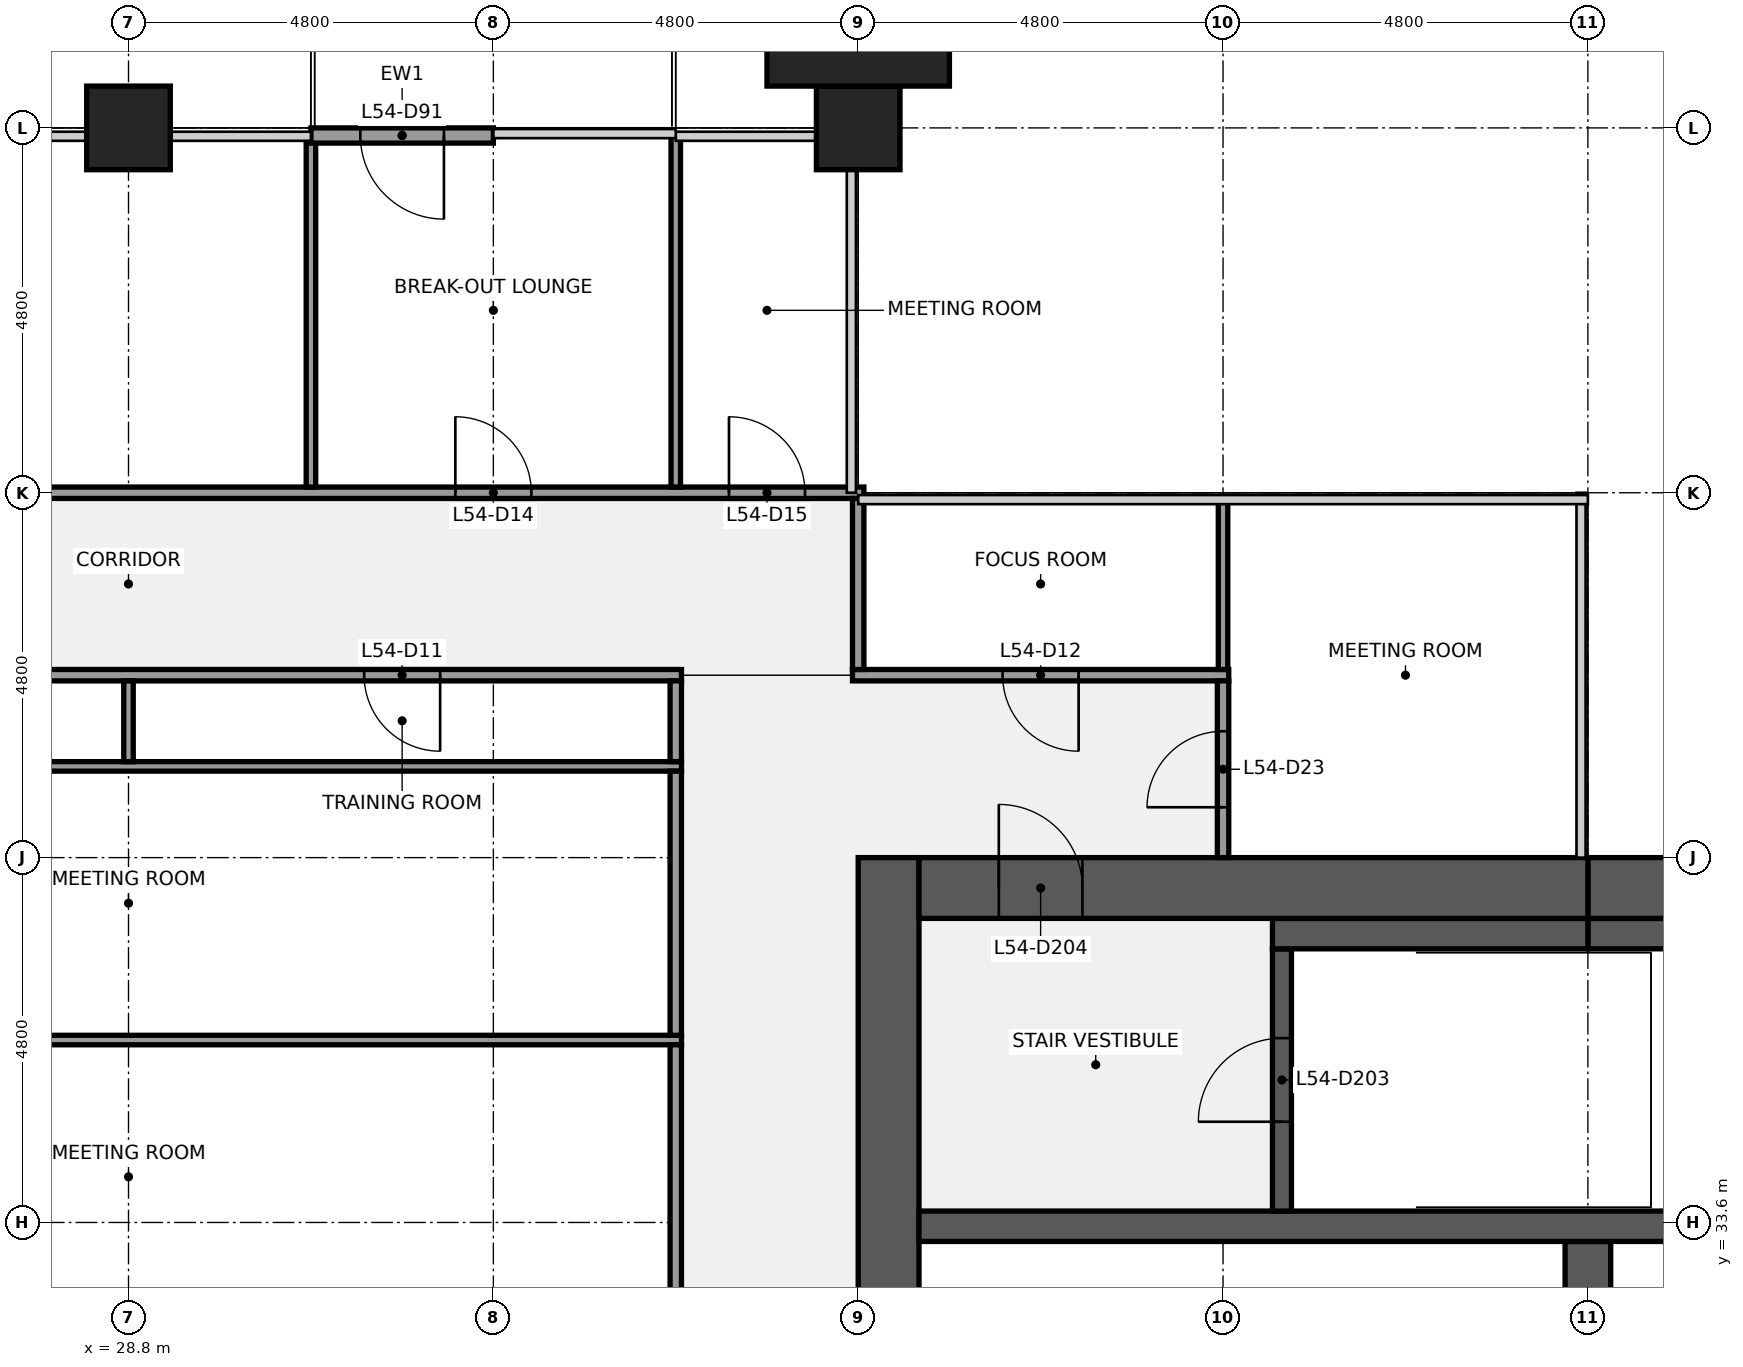
"""IFC4 building model, lengths in metres.
Left out: names, types, materials, properties, quantities, classifications, styles, units other than length and angle.
Written with IfcOpenShell. Run it as: python <this file> out.ifc"""

import sys

from ifc_helpers import new_model, si_unit, direction, frame, frame_2d, origin, origin_2d, place, context, subcontext, project, spatial, rectangle, extrude, element, fill, save


model = new_model("IFC4")
c1 = context("Model", 3, precision=1e-05, world=origin(), true_north=direction((0.0, 1.0)))
c2 = subcontext(c1, "Body", "Model", "MODEL_VIEW")
j1 = project(units=[si_unit("LENGTHUNIT", "METRE"), si_unit("PLANEANGLEUNIT", "RADIAN")], contexts=[c1])
p1 = place(None, origin())
s1 = spatial("IfcSite", under=j1, at=p1, CompositionType="ELEMENT")
p2 = place(p1, origin())
s2 = spatial("IfcBuilding", under=s1, at=p2, CompositionType="ELEMENT")
p3 = place(p2, frame((0.0, 0.0, 245.2)))
s3 = spatial("IfcBuildingStorey", under=s2, at=p3, CompositionType="ELEMENT", Elevation=245.2)
for number, where, z_axis, x_axis in (
    (1, (28.8, 48.0, 0.0), (0.0, 0.0, 1.0), (1.0, 0.0, 0.0)),
    (2, (38.4, 48.0, 0.0), (0.0, 0.0, 1.0), (1.0, 0.0, 0.0)),
):
    element("IfcColumn", number, at=place(p3, frame(where, z_axis=z_axis, x_axis=x_axis)), inside=s3, PredefinedType="COLUMN", context=c2, shape_type="SweptSolid", body=[
        extrude(rectangle(XDim=1.1, YDim=1.1, at=origin_2d()), origin(), (0.0, 0.0, 1.0), 4.0),
    ])
p4 = place(p3, frame((38.8, 9.6, 0.0), z_axis=(0.0, 0.0, 1.0), x_axis=(0.0, 1.0, 0.0)))
e3 = element("IfcWall", 3, at=p4, inside=s3, PredefinedType="SHEAR", context=c2, shape_type="SweptSolid", body=[
    extrude(rectangle(XDim=28.8, YDim=0.8, at=frame_2d((14.4, 0.0))), origin(), (0.0, 0.0, 1.0), 3.84),
])
p5 = place(p4, frame((8.7, 0.0, 0.0)))
e4 = element("IfcOpeningElement", 4, at=p5, cuts=e3, PredefinedType="OPENING", context=c2, shape_type="SweptSolid", body=[
    extrude(rectangle(XDim=1.8, YDim=2.1, at=frame_2d((0.9, 1.05))), frame((0.0, 0.41, 0.0), z_axis=(0.0, -1.0, 0.0), x_axis=(1.0, 0.0, 0.0)), (0.0, 0.0, 1.0), 0.82),
])
p6 = place(p4, frame((18.3, 0.0, 0.0)))
e5 = element("IfcOpeningElement", 5, at=p6, cuts=e3, PredefinedType="OPENING", context=c2, shape_type="SweptSolid", body=[
    extrude(rectangle(XDim=1.8, YDim=2.1, at=frame_2d((0.9, 1.05))), frame((0.0, 0.41, 0.0), z_axis=(0.0, -1.0, 0.0), x_axis=(1.0, 0.0, 0.0)), (0.0, 0.0, 1.0), 0.82),
])
p7 = place(p3, frame((48.0, 30.75, 0.0), z_axis=(0.0, 0.0, 1.0), x_axis=(0.0, 1.0, 0.0)))
e6 = element("IfcWall", 6, at=p7, inside=s3, PredefinedType="SHEAR", context=c2, shape_type="SweptSolid", body=[
    extrude(rectangle(XDim=2.6, YDim=0.6, at=frame_2d((1.3, 0.0))), origin(), (0.0, 0.0, 1.0), 3.84),
])
p8 = place(p3, frame((39.2, 33.55, 0.0), z_axis=(0.0, 0.0, 1.0), x_axis=(1.0, 0.0, 0.0)))
e7 = element("IfcWall", 7, at=p8, inside=s3, PredefinedType="SHEAR", context=c2, shape_type="SweptSolid", body=[
    extrude(rectangle(XDim=17.6, YDim=0.4, at=frame_2d((8.8, 0.0))), origin(), (0.0, 0.0, 1.0), 3.84),
])
p9 = place(p3, frame((43.975, 33.75, 0.0), z_axis=(0.0, 0.0, 1.0), x_axis=(0.0, 1.0, 0.0)))
e8 = element("IfcWall", 8, at=p9, inside=s3, PredefinedType="SHEAR", context=c2, shape_type="SweptSolid", body=[
    extrude(rectangle(XDim=3.45, YDim=0.25, at=frame_2d((1.725, 0.0))), origin(), (0.0, 0.0, 1.0), 3.84),
])
p10 = place(p9, frame((1.175, 0.0, 0.0)))
e9 = element("IfcOpeningElement", 9, at=p10, cuts=e8, PredefinedType="OPENING", context=c2, shape_type="SweptSolid", body=[
    extrude(rectangle(XDim=1.1, YDim=2.1, at=frame_2d((0.55, 1.05))), frame((0.0, 0.135, 0.0), z_axis=(0.0, -1.0, 0.0), x_axis=(1.0, 0.0, 0.0)), (0.0, 0.0, 1.0), 0.27),
])
p11 = place(p3, frame((48.0, 37.4, 0.0), z_axis=(0.0, 0.0, 1.0), x_axis=(1.0, 0.0, 0.0)))
e10 = element("IfcWall", 10, at=p11, inside=s3, PredefinedType="SHEAR", context=c2, shape_type="SweptSolid", body=[
    extrude(rectangle(XDim=3.35, YDim=0.4, at=frame_2d((1.675, 0.0))), origin(), (0.0, 0.0, 1.0), 3.84),
])
p12 = place(p3, frame((43.85, 37.4, 0.0), z_axis=(0.0, 0.0, 1.0), x_axis=(1.0, 0.0, 0.0)))
e11 = element("IfcWall", 11, at=p12, inside=s3, PredefinedType="SHEAR", context=c2, shape_type="SweptSolid", body=[
    extrude(rectangle(XDim=4.15, YDim=0.4, at=frame_2d((2.075, 0.0))), origin(), (0.0, 0.0, 1.0), 3.84),
])
p13 = place(p3, frame((48.0, 38.0, 0.0), z_axis=(0.0, 0.0, 1.0), x_axis=(1.0, 0.0, 0.0)))
e12 = element("IfcWall", 12, at=p13, inside=s3, PredefinedType="SHEAR", context=c2, shape_type="SweptSolid", body=[
    extrude(rectangle(XDim=8.8, YDim=0.8, at=frame_2d((4.4, 0.0))), origin(), (0.0, 0.0, 1.0), 3.84),
])
p14 = place(p13, frame((1.5, 0.0, 0.9)))
e13 = element("IfcOpeningElement", 13, at=p14, cuts=e12, PredefinedType="OPENING", context=c2, shape_type="SweptSolid", body=[
    extrude(rectangle(XDim=1.8, YDim=1.5, at=frame_2d((0.9, 0.75))), frame((0.0, 0.41, 0.0), z_axis=(0.0, -1.0, 0.0), x_axis=(1.0, 0.0, 0.0)), (0.0, 0.0, 1.0), 0.82),
])
p15 = place(p3, frame((39.2, 38.0, 0.0), z_axis=(0.0, 0.0, 1.0), x_axis=(1.0, 0.0, 0.0)))
e14 = element("IfcWall", 14, at=p15, inside=s3, PredefinedType="SHEAR", context=c2, shape_type="SweptSolid", body=[
    extrude(rectangle(XDim=8.8, YDim=0.8, at=frame_2d((4.4, 0.0))), origin(), (0.0, 0.0, 1.0), 3.84),
])
p16 = place(p15, frame((1.05, 0.0, 0.0)))
e15 = element("IfcOpeningElement", 15, at=p16, cuts=e14, PredefinedType="OPENING", context=c2, shape_type="SweptSolid", body=[
    extrude(rectangle(XDim=1.1, YDim=2.1, at=frame_2d((0.55, 1.05))), frame((0.0, 0.41, 0.0), z_axis=(0.0, -1.0, 0.0), x_axis=(1.0, 0.0, 0.0)), (0.0, 0.0, 1.0), 0.82),
])
for number, where, z_axis, x_axis in (
    (16, (21.525, 36.0, 0.0), (0.0, 0.0, 1.0), (1.0, 0.0, 0.0)),
    (17, (21.525, 39.6, 0.0), (0.0, 0.0, 1.0), (1.0, 0.0, 0.0)),
):
    element("IfcWall", number, at=place(p3, frame(where, z_axis=z_axis, x_axis=x_axis)), inside=s3, PredefinedType="PARTITIONING", context=c2, shape_type="SweptSolid", body=[
        extrude(rectangle(XDim=14.55, YDim=0.125, at=frame_2d((7.275, 0.0))), origin(), (0.0, 0.0, 1.0), 2.87),
    ])
p17 = place(p3, frame((21.525, 40.8, 0.0), z_axis=(0.0, 0.0, 1.0), x_axis=(1.0, 0.0, 0.0)))
e18 = element("IfcWall", 18, at=p17, inside=s3, PredefinedType="PARTITIONING", context=c2, shape_type="SweptSolid", body=[
    extrude(rectangle(XDim=14.55, YDim=0.15, at=frame_2d((7.275, 0.0))), origin(), (0.0, 0.0, 1.0), 2.87),
])
p18 = place(p17, frame((3.175, 0.0, 0.0)))
e19 = element("IfcOpeningElement", 19, at=p18, cuts=e18, PredefinedType="OPENING", context=c2, shape_type="SweptSolid", body=[
    extrude(rectangle(XDim=1.0, YDim=2.1, at=frame_2d((0.5, 1.05))), frame((0.0, 0.085, 0.0), z_axis=(0.0, -1.0, 0.0), x_axis=(1.0, 0.0, 0.0)), (0.0, 0.0, 1.0), 0.17),
])
p19 = place(p17, frame((10.375, 0.0, 0.0)))
e20 = element("IfcOpeningElement", 20, at=p19, cuts=e18, PredefinedType="OPENING", context=c2, shape_type="SweptSolid", body=[
    extrude(rectangle(XDim=1.0, YDim=2.1, at=frame_2d((0.5, 1.05))), frame((0.0, 0.085, 0.0), z_axis=(0.0, -1.0, 0.0), x_axis=(1.0, 0.0, 0.0)), (0.0, 0.0, 1.0), 0.17),
])
p20 = place(p3, frame((38.325, 40.8, 0.0), z_axis=(0.0, 0.0, 1.0), x_axis=(1.0, 0.0, 0.0)))
e21 = element("IfcWall", 21, at=p20, inside=s3, PredefinedType="PARTITIONING", context=c2, shape_type="SweptSolid", body=[
    extrude(rectangle(XDim=4.95, YDim=0.15, at=frame_2d((2.475, 0.0))), origin(), (0.0, 0.0, 1.0), 2.87),
])
p21 = place(p20, frame((1.975, 0.0, 0.0)))
e22 = element("IfcOpeningElement", 22, at=p21, cuts=e21, PredefinedType="OPENING", context=c2, shape_type="SweptSolid", body=[
    extrude(rectangle(XDim=1.0, YDim=2.1, at=frame_2d((0.5, 1.05))), frame((0.0, 0.085, 0.0), z_axis=(0.0, -1.0, 0.0), x_axis=(1.0, 0.0, 0.0)), (0.0, 0.0, 1.0), 0.17),
])
p22 = place(p3, frame((19.125, 43.2, 0.0), z_axis=(0.0, 0.0, 1.0), x_axis=(1.0, 0.0, 0.0)))
e23 = element("IfcWall", 23, at=p22, inside=s3, PredefinedType="PARTITIONING", context=c2, shape_type="SweptSolid", body=[
    extrude(rectangle(XDim=19.35, YDim=0.15, at=frame_2d((9.675, 0.0))), origin(), (0.0, 0.0, 1.0), 2.87),
])
p23 = place(p22, frame((5.575, 0.0, 0.0)))
e24 = element("IfcOpeningElement", 24, at=p23, cuts=e23, PredefinedType="OPENING", context=c2, shape_type="SweptSolid", body=[
    extrude(rectangle(XDim=1.0, YDim=2.1, at=frame_2d((0.5, 1.05))), frame((0.0, 0.085, 0.0), z_axis=(0.0, -1.0, 0.0), x_axis=(1.0, 0.0, 0.0)), (0.0, 0.0, 1.0), 0.17),
])
p24 = place(p22, frame((13.975, 0.0, 0.0)))
e25 = element("IfcOpeningElement", 25, at=p24, cuts=e23, PredefinedType="OPENING", context=c2, shape_type="SweptSolid", body=[
    extrude(rectangle(XDim=1.0, YDim=2.1, at=frame_2d((0.5, 1.05))), frame((0.0, 0.085, 0.0), z_axis=(0.0, -1.0, 0.0), x_axis=(1.0, 0.0, 0.0)), (0.0, 0.0, 1.0), 0.17),
])
p25 = place(p22, frame((17.575, 0.0, 0.0)))
e26 = element("IfcOpeningElement", 26, at=p25, cuts=e23, PredefinedType="OPENING", context=c2, shape_type="SweptSolid", body=[
    extrude(rectangle(XDim=1.0, YDim=2.1, at=frame_2d((0.5, 1.05))), frame((0.0, 0.085, 0.0), z_axis=(0.0, -1.0, 0.0), x_axis=(1.0, 0.0, 0.0)), (0.0, 0.0, 1.0), 0.17),
])
p26 = place(p3, frame((28.8, 39.663, 0.0), z_axis=(0.0, 0.0, 1.0), x_axis=(0.0, 1.0, 0.0)))
e27 = element("IfcWall", 27, at=p26, inside=s3, PredefinedType="PARTITIONING", context=c2, shape_type="SweptSolid", body=[
    extrude(rectangle(XDim=1.062, YDim=0.125, at=frame_2d((0.531, 0.0))), origin(), (0.0, 0.0, 1.0), 2.87),
])
for number, where, z_axis, x_axis in (
    (28, (31.2, 43.275, 0.0), (0.0, 0.0, 1.0), (0.0, 1.0, 0.0)),
    (29, (36.0, 43.275, 0.0), (0.0, 0.0, 1.0), (0.0, 1.0, 0.0)),
):
    element("IfcWall", number, at=place(p3, frame(where, z_axis=z_axis, x_axis=x_axis)), inside=s3, PredefinedType="PARTITIONING", context=c2, shape_type="SweptSolid", body=[
        extrude(rectangle(XDim=4.625, YDim=0.125, at=frame_2d((2.312, 0.0))), origin(), (0.0, 0.0, 1.0), 2.87),
    ])
for number, where, z_axis, x_axis in (
    (30, (36.0, 32.462, 0.0), (0.0, 0.0, 1.0), (0.0, 1.0, 0.0)),
    (31, (36.0, 36.062, 0.0), (0.0, 0.0, 1.0), (0.0, 1.0, 0.0)),
):
    element("IfcWall", number, at=place(p3, frame(where, z_axis=z_axis, x_axis=x_axis)), inside=s3, PredefinedType="PARTITIONING", context=c2, shape_type="SweptSolid", body=[
        extrude(rectangle(XDim=3.475, YDim=0.15, at=frame_2d((1.738, 0.0))), origin(), (0.0, 0.0, 1.0), 2.87),
    ])
p27 = place(p3, frame((36.0, 39.663, 0.0), z_axis=(0.0, 0.0, 1.0), x_axis=(0.0, 1.0, 0.0)))
e32 = element("IfcWall", 32, at=p27, inside=s3, PredefinedType="PARTITIONING", context=c2, shape_type="SweptSolid", body=[
    extrude(rectangle(XDim=1.062, YDim=0.15, at=frame_2d((0.531, 0.0))), origin(), (0.0, 0.0, 1.0), 2.87),
])
p28 = place(p3, frame((38.4, 40.875, 0.0), z_axis=(0.0, 0.0, 1.0), x_axis=(0.0, 1.0, 0.0)))
e33 = element("IfcWall", 33, at=p28, inside=s3, PredefinedType="PARTITIONING", context=c2, shape_type="SweptSolid", body=[
    extrude(rectangle(XDim=2.25, YDim=0.15, at=frame_2d((1.125, 0.0))), origin(), (0.0, 0.0, 1.0), 2.87),
])
p29 = place(p3, frame((43.2, 40.875, 0.0), z_axis=(0.0, 0.0, 1.0), x_axis=(0.0, 1.0, 0.0)))
e34 = element("IfcWall", 34, at=p29, inside=s3, PredefinedType="PARTITIONING", context=c2, shape_type="SweptSolid", body=[
    extrude(rectangle(XDim=2.225, YDim=0.125, at=frame_2d((1.113, 0.0))), origin(), (0.0, 0.0, 1.0), 2.87),
])
p30 = place(p3, frame((43.2, 38.4, 0.0), z_axis=(0.0, 0.0, 1.0), x_axis=(0.0, 1.0, 0.0)))
e35 = element("IfcWall", 35, at=p30, inside=s3, PredefinedType="PARTITIONING", context=c2, shape_type="SweptSolid", body=[
    extrude(rectangle(XDim=2.325, YDim=0.15, at=frame_2d((1.163, 0.0))), origin(), (0.0, 0.0, 1.0), 2.87),
])
p31 = place(p30, frame((0.663, 0.0, 0.0)))
e36 = element("IfcOpeningElement", 36, at=p31, cuts=e35, PredefinedType="OPENING", context=c2, shape_type="SweptSolid", body=[
    extrude(rectangle(XDim=1.0, YDim=2.1, at=frame_2d((0.5, 1.05))), frame((0.0, 0.085, 0.0), z_axis=(0.0, -1.0, 0.0), x_axis=(1.0, 0.0, 0.0)), (0.0, 0.0, 1.0), 0.17),
])
p32 = place(p3, frame((33.6, 47.9, 0.0), z_axis=(0.0, 0.0, 1.0), x_axis=(-1.0, 0.0, 0.0)))
e37 = element("IfcWall", 37, at=p32, inside=s3, PredefinedType="SOLIDWALL", context=c2, shape_type="SweptSolid", body=[
    extrude(rectangle(XDim=2.4, YDim=0.2, at=frame_2d((1.2, 0.0))), origin(), (0.0, 0.0, 1.0), 3.314),
])
p33 = place(p32, frame((0.65, 0.0, 0.0)))
e38 = element("IfcOpeningElement", 38, at=p33, cuts=e37, PredefinedType="OPENING", context=c2, shape_type="SweptSolid", body=[
    extrude(rectangle(XDim=1.1, YDim=2.1, at=frame_2d((0.55, 1.05))), frame((0.0, 0.11, 0.0), z_axis=(0.0, -1.0, 0.0), x_axis=(1.0, 0.0, 0.0)), (0.0, 0.0, 1.0), 0.22),
])
p34 = place(p3, frame((38.4, 49.025, 0.0), z_axis=(0.0, 0.0, 1.0), x_axis=(1.0, 0.0, 0.0)))
e39 = element("IfcColumn", 39, at=p34, inside=s3, PredefinedType="PILASTER", context=c2, shape_type="SweptSolid", body=[
    extrude(rectangle(XDim=2.4, YDim=0.95, at=origin_2d()), origin(), (0.0, 0.0, 1.0), 4.0),
])
p35 = place(p10, origin())
e40 = element("IfcDoor", 40, at=p35, inside=s3, OperationType="SINGLE_SWING_LEFT", PredefinedType="DOOR", context=c2, shape_type="SweptSolid", body=[
    extrude(rectangle(XDim=1.1, YDim=2.1, at=frame_2d((0.55, 1.05))), frame((0.0, 0.025, 0.0), z_axis=(0.0, -1.0, 0.0), x_axis=(1.0, 0.0, 0.0)), (0.0, 0.0, 1.0), 0.05),
])
fill(e9, e40)
p36 = place(p16, origin())
e41 = element("IfcDoor", 41, at=p36, inside=s3, OperationType="SINGLE_SWING_LEFT", PredefinedType="DOOR", context=c2, shape_type="SweptSolid", body=[
    extrude(rectangle(XDim=1.1, YDim=2.1, at=frame_2d((0.55, 1.05))), frame((0.0, 0.025, 0.0), z_axis=(0.0, -1.0, 0.0), x_axis=(1.0, 0.0, 0.0)), (0.0, 0.0, 1.0), 0.05),
])
fill(e15, e41)
p37 = place(p19, origin())
e42 = element("IfcDoor", 42, at=p37, inside=s3, OperationType="SINGLE_SWING_RIGHT", PredefinedType="DOOR", context=c2, shape_type="SweptSolid", body=[
    extrude(rectangle(XDim=1.0, YDim=2.1, at=frame_2d((0.5, 1.05))), frame((0.0, 0.025, 0.0), z_axis=(0.0, -1.0, 0.0), x_axis=(1.0, 0.0, 0.0)), (0.0, 0.0, 1.0), 0.05),
])
fill(e20, e42)
p38 = place(p21, origin())
e43 = element("IfcDoor", 43, at=p38, inside=s3, OperationType="SINGLE_SWING_RIGHT", PredefinedType="DOOR", context=c2, shape_type="SweptSolid", body=[
    extrude(rectangle(XDim=1.0, YDim=2.1, at=frame_2d((0.5, 1.05))), frame((0.0, 0.025, 0.0), z_axis=(0.0, -1.0, 0.0), x_axis=(1.0, 0.0, 0.0)), (0.0, 0.0, 1.0), 0.05),
])
fill(e22, e43)
p39 = place(p24, origin())
e44 = element("IfcDoor", 44, at=p39, inside=s3, OperationType="SINGLE_SWING_LEFT", PredefinedType="DOOR", context=c2, shape_type="SweptSolid", body=[
    extrude(rectangle(XDim=1.0, YDim=2.1, at=frame_2d((0.5, 1.05))), frame((0.0, 0.025, 0.0), z_axis=(0.0, -1.0, 0.0), x_axis=(1.0, 0.0, 0.0)), (0.0, 0.0, 1.0), 0.05),
])
fill(e25, e44)
p40 = place(p25, origin())
e45 = element("IfcDoor", 45, at=p40, inside=s3, OperationType="SINGLE_SWING_LEFT", PredefinedType="DOOR", context=c2, shape_type="SweptSolid", body=[
    extrude(rectangle(XDim=1.0, YDim=2.1, at=frame_2d((0.5, 1.05))), frame((0.0, 0.025, 0.0), z_axis=(0.0, -1.0, 0.0), x_axis=(1.0, 0.0, 0.0)), (0.0, 0.0, 1.0), 0.05),
])
fill(e26, e45)
p41 = place(p31, origin())
e46 = element("IfcDoor", 46, at=p41, inside=s3, OperationType="SINGLE_SWING_LEFT", PredefinedType="DOOR", context=c2, shape_type="SweptSolid", body=[
    extrude(rectangle(XDim=1.0, YDim=2.1, at=frame_2d((0.5, 1.05))), frame((0.0, 0.025, 0.0), z_axis=(0.0, -1.0, 0.0), x_axis=(1.0, 0.0, 0.0)), (0.0, 0.0, 1.0), 0.05),
])
fill(e36, e46)
p42 = place(p33, origin())
e47 = element("IfcDoor", 47, at=p42, inside=s3, OperationType="SINGLE_SWING_LEFT", PredefinedType="DOOR", context=c2, shape_type="SweptSolid", body=[
    extrude(rectangle(XDim=1.1, YDim=2.1, at=frame_2d((0.55, 1.05))), frame((0.0, 0.025, 0.0), z_axis=(0.0, -1.0, 0.0), x_axis=(1.0, 0.0, 0.0)), (0.0, 0.0, 1.0), 0.05),
])
fill(e38, e47)
save(model, sys.argv[1])
